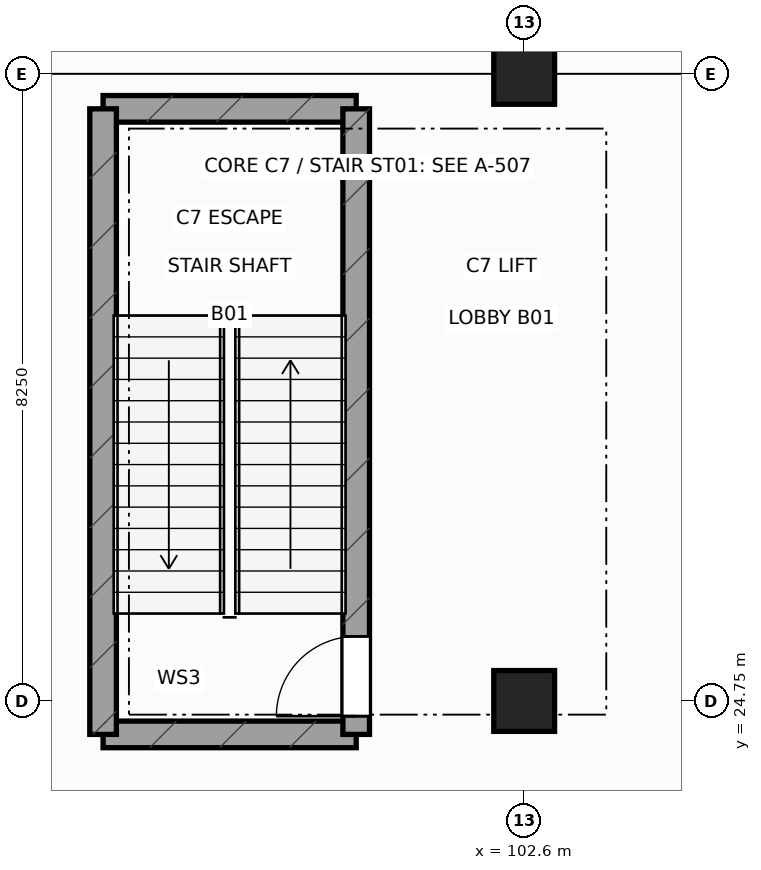
"""IFC4 building model, lengths in metres.
Left out: names, types, materials, properties, quantities, classifications, styles, units other than length and angle.
Written with IfcOpenShell. Run it as: python <this file> out.ifc"""

import sys

from ifc_helpers import new_model, si_unit, direction, frame, frame_2d, origin, origin_2d, place, context, subcontext, project, spatial, rectangle, extrude, element, fill, save


model = new_model("IFC4")
c1 = context("Model", 3, precision=1e-05, world=origin(), true_north=direction((0.0, 1.0)))
c2 = subcontext(c1, "Body", "Model", "MODEL_VIEW")
j1 = project(units=[si_unit("LENGTHUNIT", "METRE"), si_unit("PLANEANGLEUNIT", "RADIAN")], contexts=[c1])
p1 = place(None, origin())
s1 = spatial("IfcSite", under=j1, at=p1, CompositionType="ELEMENT")
p2 = place(p1, origin())
s2 = spatial("IfcBuilding", under=s1, at=p2, CompositionType="ELEMENT")
p3 = place(p2, frame((0.0, 0.0, -5.4)))
s3 = spatial("IfcBuildingStorey", under=s2, at=p3, CompositionType="ELEMENT", Elevation=-5.4)
for number, where, z_axis, x_axis in (
    (1, (102.6, 24.75, 0.0), (0.0, 0.0, 1.0), (1.0, 0.0, 0.0)),
    (2, (102.6, 33.0, 0.0), (0.0, 0.0, 1.0), (1.0, 0.0, 0.0)),
):
    element("IfcColumn", number, at=place(p3, frame(where, z_axis=z_axis, x_axis=x_axis)), inside=s3, PredefinedType="COLUMN", context=c2, shape_type="SweptSolid", body=[
        extrude(rectangle(XDim=0.8, YDim=0.8, at=origin_2d()), origin(), (0.0, 0.0, 1.0), 5.4),
    ])
for number, where, z_axis, x_axis in (
    (3, (97.06, 24.31, 0.0), (0.0, 0.0, 1.0), (1.0, 0.0, 0.0)),
    (4, (97.06, 32.54, 0.0), (0.0, 0.0, 1.0), (1.0, 0.0, 0.0)),
):
    element("IfcWall", number, at=place(p3, frame(where, z_axis=z_axis, x_axis=x_axis)), inside=s3, PredefinedType="SHEAR", context=c2, shape_type="SweptSolid", body=[
        extrude(rectangle(XDim=3.33, YDim=0.35, at=frame_2d((1.665, 0.0))), origin(), (0.0, 0.0, 1.0), 5.08),
    ])
p4 = place(p3, frame((97.06, 24.31, 0.0), z_axis=(0.0, 0.0, 1.0), x_axis=(0.0, 1.0, 0.0)))
e5 = element("IfcWall", 5, at=p4, inside=s3, PredefinedType="SHEAR", context=c2, shape_type="SweptSolid", body=[
    extrude(rectangle(XDim=8.23, YDim=0.35, at=frame_2d((4.115, 0.0))), origin(), (0.0, 0.0, 1.0), 5.08),
])
p5 = place(p3, frame((100.39, 24.31, 0.0), z_axis=(0.0, 0.0, 1.0), x_axis=(0.0, 1.0, 0.0)))
e6 = element("IfcWall", 6, at=p5, inside=s3, PredefinedType="SHEAR", context=c2, shape_type="SweptSolid", body=[
    extrude(rectangle(XDim=8.23, YDim=0.35, at=frame_2d((4.115, 0.0))), origin(), (0.0, 0.0, 1.0), 5.08),
])
p6 = place(p5, frame((0.24, 0.0, 0.0)))
e7 = element("IfcOpeningElement", 7, at=p6, cuts=e6, PredefinedType="OPENING", context=c2, shape_type="SweptSolid", body=[
    extrude(rectangle(XDim=1.05, YDim=2.18, at=frame_2d((0.525, 1.09))), frame((0.0, 0.185, 0.0), z_axis=(0.0, -1.0, 0.0), x_axis=(1.0, 0.0, 0.0)), (0.0, 0.0, 1.0), 0.37),
])
p7 = place(p6, origin())
e8 = element("IfcDoor", 8, at=p7, inside=s3, OperationType="SINGLE_SWING_LEFT", PredefinedType="DOOR", context=c2, shape_type="SweptSolid", body=[
    extrude(rectangle(XDim=1.05, YDim=2.18, at=frame_2d((0.525, 1.09))), frame((0.0, 0.025, 0.0), z_axis=(0.0, -1.0, 0.0), x_axis=(1.0, 0.0, 0.0)), (0.0, 0.0, 1.0), 0.05),
])
fill(e7, e8)
save(model, sys.argv[1])
